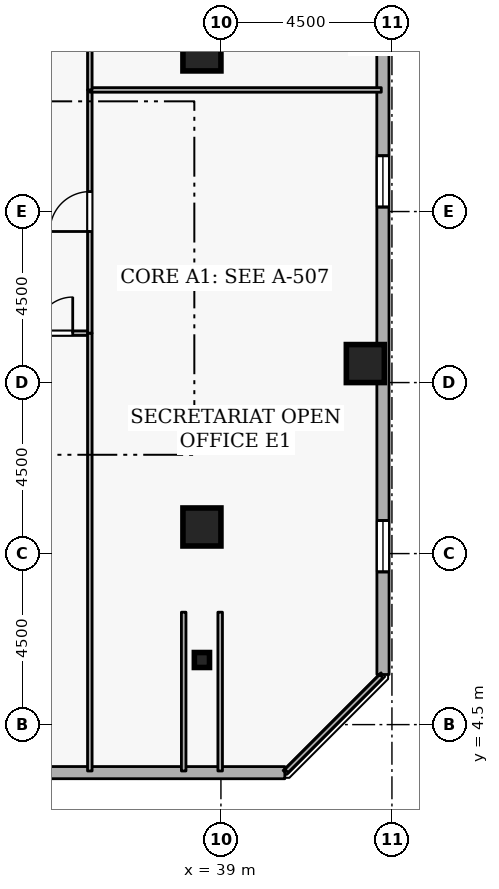
"""IFC4 building model, lengths in metres.
Left out: names, types, materials, properties, quantities, classifications, styles, units other than length and angle.
Written with IfcOpenShell. Run it as: python <this file> out.ifc"""

import sys

from ifc_helpers import new_model, si_unit, direction, frame, frame_2d, origin, origin_2d, place, context, subcontext, project, spatial, rectangle, i_section, extrude, element, fill, save


model = new_model("IFC4")
c1 = context("Model", 3, precision=1e-05, world=origin(), true_north=direction((0.0, 1.0)))
c2 = subcontext(c1, "Body", "Model", "MODEL_VIEW")
j1 = project(units=[si_unit("LENGTHUNIT", "METRE"), si_unit("PLANEANGLEUNIT", "RADIAN")], contexts=[c1])
p1 = place(None, origin())
s1 = spatial("IfcSite", under=j1, at=p1, CompositionType="ELEMENT")
p2 = place(p1, origin())
s2 = spatial("IfcBuilding", under=s1, at=p2, CompositionType="ELEMENT")
p3 = place(p2, frame((0.0, 0.0, 251.1)))
s3 = spatial("IfcBuildingStorey", under=s2, at=p3, CompositionType="ELEMENT", Elevation=251.1)
for number, where, z_axis, x_axis in (
    (1, (38.5, 9.7, 0.0), (0.0, 0.0, 1.0), (1.0, 0.0, 0.0)),
    (2, (42.8, 14.0, 0.0), (0.0, 0.0, 1.0), (1.0, 0.0, 0.0)),
    (3, (38.5, 22.2, 0.0), (0.0, 0.0, 1.0), (1.0, 0.0, 0.0)),
):
    element("IfcColumn", number, at=place(p3, frame(where, z_axis=z_axis, x_axis=x_axis)), inside=s3, PredefinedType="COLUMN", context=c2, shape_type="SweptSolid", body=[
        extrude(rectangle(XDim=1.0, YDim=1.0, at=origin_2d()), origin(), (0.0, 0.0, 1.0), 3.6),
    ])
p4 = place(p3, frame((38.5, 6.2, 0.0), z_axis=(0.0, 0.0, 1.0), x_axis=(1.0, 0.0, 0.0)))
e4 = element("IfcColumn", 4, at=p4, inside=s3, PredefinedType="COLUMN", context=c2, shape_type="SweptSolid", body=[
    extrude(i_section(OverallWidth=0.399, OverallDepth=0.394, WebThickness=0.023, FlangeThickness=0.037, FilletRadius=0.015, at=origin_2d()), origin(), (0.0, 0.0, 1.0), 3.6),
])
p5 = place(p3, frame((6.249, 3.242, 0.0), z_axis=(0.0, 0.0, 1.0), x_axis=(0.999999983007, -0.000184351399, 0.0)))
e5 = element("IfcWall", 5, at=p5, inside=s3, PredefinedType="STANDARD", context=c2, shape_type="SweptSolid", body=[
    extrude(rectangle(XDim=34.432, YDim=0.32, at=frame_2d((17.216, 0.0))), origin(), (0.0, 0.0, 1.0), 2.22),
])
p6 = place(p5, frame((2.7, 0.0, 0.72)))
e6 = element("IfcOpeningElement", 6, at=p6, cuts=e5, PredefinedType="OPENING", context=c2, shape_type="SweptSolid", body=[
    extrude(rectangle(XDim=1.35, YDim=1.05, at=frame_2d((0.675, 0.525))), frame((0.0, 0.17, 0.0), z_axis=(0.0, -1.0, 0.0), x_axis=(1.0, 0.0, 0.0)), (0.0, 0.0, 1.0), 0.34),
])
p7 = place(p5, frame((12.3, 0.0, 0.72)))
e7 = element("IfcOpeningElement", 7, at=p7, cuts=e5, PredefinedType="OPENING", context=c2, shape_type="SweptSolid", body=[
    extrude(rectangle(XDim=1.35, YDim=1.05, at=frame_2d((0.675, 0.525))), frame((0.0, 0.17, 0.0), z_axis=(0.0, -1.0, 0.0), x_axis=(1.0, 0.0, 0.0)), (0.0, 0.0, 1.0), 0.34),
])
p8 = place(p5, frame((17.1, 0.0, 0.72)))
e8 = element("IfcOpeningElement", 8, at=p8, cuts=e5, PredefinedType="OPENING", context=c2, shape_type="SweptSolid", body=[
    extrude(rectangle(XDim=1.35, YDim=1.05, at=frame_2d((0.675, 0.525))), frame((0.0, 0.17, 0.0), z_axis=(0.0, -1.0, 0.0), x_axis=(1.0, 0.0, 0.0)), (0.0, 0.0, 1.0), 0.34),
])
p9 = place(p5, frame((21.9, 0.0, 0.72)))
e9 = element("IfcOpeningElement", 9, at=p9, cuts=e5, PredefinedType="OPENING", context=c2, shape_type="SweptSolid", body=[
    extrude(rectangle(XDim=1.35, YDim=1.05, at=frame_2d((0.675, 0.525))), frame((0.0, 0.17, 0.0), z_axis=(0.0, -1.0, 0.0), x_axis=(1.0, 0.0, 0.0)), (0.0, 0.0, 1.0), 0.34),
])
p10 = place(p3, frame((43.265, 5.819, 0.0), z_axis=(0.0, 0.0, 1.0), x_axis=(-0.000184351399, 0.999999983007, 0.0)))
e10 = element("IfcWall", 10, at=p10, inside=s3, PredefinedType="STANDARD", context=c2, shape_type="SweptSolid", body=[
    extrude(rectangle(XDim=34.432, YDim=0.32, at=frame_2d((17.216, 0.0))), origin(), (0.0, 0.0, 1.0), 2.22),
])
p11 = place(p10, frame((2.7, 0.0, 0.72)))
e11 = element("IfcOpeningElement", 11, at=p11, cuts=e10, PredefinedType="OPENING", context=c2, shape_type="SweptSolid", body=[
    extrude(rectangle(XDim=1.35, YDim=1.05, at=frame_2d((0.675, 0.525))), frame((0.0, 0.17, 0.0), z_axis=(0.0, -1.0, 0.0), x_axis=(1.0, 0.0, 0.0)), (0.0, 0.0, 1.0), 0.34),
])
p12 = place(p10, frame((12.3, 0.0, 0.72)))
e12 = element("IfcOpeningElement", 12, at=p12, cuts=e10, PredefinedType="OPENING", context=c2, shape_type="SweptSolid", body=[
    extrude(rectangle(XDim=1.35, YDim=1.05, at=frame_2d((0.675, 0.525))), frame((0.0, 0.17, 0.0), z_axis=(0.0, -1.0, 0.0), x_axis=(1.0, 0.0, 0.0)), (0.0, 0.0, 1.0), 0.34),
])
p13 = place(p10, frame((17.1, 0.0, 0.72)))
e13 = element("IfcOpeningElement", 13, at=p13, cuts=e10, PredefinedType="OPENING", context=c2, shape_type="SweptSolid", body=[
    extrude(rectangle(XDim=1.35, YDim=1.05, at=frame_2d((0.675, 0.525))), frame((0.0, 0.17, 0.0), z_axis=(0.0, -1.0, 0.0), x_axis=(1.0, 0.0, 0.0)), (0.0, 0.0, 1.0), 0.34),
])
p14 = place(p10, frame((26.7, 0.0, 0.72)))
e14 = element("IfcOpeningElement", 14, at=p14, cuts=e10, PredefinedType="OPENING", context=c2, shape_type="SweptSolid", body=[
    extrude(rectangle(XDim=1.35, YDim=1.05, at=frame_2d((0.675, 0.525))), frame((0.0, 0.17, 0.0), z_axis=(0.0, -1.0, 0.0), x_axis=(1.0, 0.0, 0.0)), (0.0, 0.0, 1.0), 0.34),
])
p15 = place(p3, frame((33.7, 14.8, 0.0), z_axis=(0.0, 0.0, 1.0), x_axis=(1.0, 0.0, 0.0)))
e15 = element("IfcWall", 15, at=p15, inside=s3, PredefinedType="PARTITIONING", context=c2, shape_type="SweptSolid", body=[
    extrude(rectangle(XDim=1.85, YDim=0.12, at=frame_2d((0.925, 0.0))), origin(), (0.0, 0.0, 1.0), 3.32),
])
p16 = place(p15, frame((0.45, 0.0, 0.0)))
e16 = element("IfcOpeningElement", 16, at=p16, cuts=e15, PredefinedType="OPENING", context=c2, shape_type="SweptSolid", body=[
    extrude(rectangle(XDim=0.95, YDim=2.1, at=frame_2d((0.475, 1.05))), frame((0.0, 0.07, 0.0), z_axis=(0.0, -1.0, 0.0), x_axis=(1.0, 0.0, 0.0)), (0.0, 0.0, 1.0), 0.14),
])
p17 = place(p3, frame((35.55, 14.8, 0.0), z_axis=(0.0, 0.0, 1.0), x_axis=(0.0, -1.0, 0.0)))
e17 = element("IfcWall", 17, at=p17, inside=s3, PredefinedType="PARTITIONING", context=c2, shape_type="SweptSolid", body=[
    extrude(rectangle(XDim=11.52, YDim=0.12, at=frame_2d((5.76, 0.0))), origin(), (0.0, 0.0, 1.0), 3.32),
])
for number, where, z_axis, x_axis in (
    (18, (38.98, 3.28, 0.0), (0.0, 0.0, 1.0), (0.0, 1.0, 0.0)),
    (19, (38.02, 7.458, 0.0), (0.0, 0.0, 1.0), (0.0, -1.0, 0.0)),
):
    element("IfcWall", number, at=place(p3, frame(where, z_axis=z_axis, x_axis=x_axis)), inside=s3, PredefinedType="PARTITIONING", context=c2, shape_type="SweptSolid", body=[
        extrude(rectangle(XDim=4.178, YDim=0.12, at=frame_2d((2.089, 0.0))), origin(), (0.0, 0.0, 1.0), 1.785),
    ])
p18 = place(p3, frame((35.55, 14.8, 0.0), z_axis=(0.0, 0.0, 1.0), x_axis=(0.0, 1.0, 0.0)))
e20 = element("IfcWall", 20, at=p18, inside=s3, PredefinedType="PARTITIONING", context=c2, shape_type="SweptSolid", body=[
    extrude(rectangle(XDim=6.4, YDim=0.12, at=frame_2d((3.2, 0.0))), origin(), (0.0, 0.0, 1.0), 3.32),
])
p19 = place(p18, frame((2.675, 0.0, 0.0)))
e21 = element("IfcOpeningElement", 21, at=p19, cuts=e20, PredefinedType="OPENING", context=c2, shape_type="SweptSolid", body=[
    extrude(rectangle(XDim=1.05, YDim=2.1, at=frame_2d((0.525, 1.05))), frame((0.0, 0.07, 0.0), z_axis=(0.0, -1.0, 0.0), x_axis=(1.0, 0.0, 0.0)), (0.0, 0.0, 1.0), 0.14),
])
p20 = place(p3, frame((35.55, 21.2, 0.0), z_axis=(0.0, 0.0, 1.0), x_axis=(1.0, 0.0, 0.0)))
e22 = element("IfcWall", 22, at=p20, inside=s3, PredefinedType="PARTITIONING", context=c2, shape_type="SweptSolid", body=[
    extrude(rectangle(XDim=7.67, YDim=0.12, at=frame_2d((3.835, 0.0))), origin(), (0.0, 0.0, 1.0), 3.32),
])
p21 = place(p3, frame((43.22, 5.775, 0.0), z_axis=(0.0, 0.0, 1.0), x_axis=(-0.707106781187, -0.707106781187, 0.0)))
e23 = element("IfcWall", 23, at=p21, inside=s3, PredefinedType="PARTITIONING", context=c2, shape_type="SweptSolid", body=[
    extrude(rectangle(XDim=3.528, YDim=0.12, at=frame_2d((1.764, 0.0))), origin(), (0.0, 0.0, 1.0), 3.32),
])
p22 = place(p3, frame((35.55, 21.2, 0.0), z_axis=(0.0, 0.0, 1.0), x_axis=(0.0, 1.0, 0.0)))
e24 = element("IfcWall", 24, at=p22, inside=s3, PredefinedType="PARTITIONING", context=c2, shape_type="SweptSolid", body=[
    extrude(rectangle(XDim=5.4, YDim=0.12, at=frame_2d((2.7, 0.0))), origin(), (0.0, 0.0, 1.0), 3.32),
])
p23 = place(p22, frame((2.225, 0.0, 0.0)))
e25 = element("IfcOpeningElement", 25, at=p23, cuts=e24, PredefinedType="OPENING", context=c2, shape_type="SweptSolid", body=[
    extrude(rectangle(XDim=0.95, YDim=2.1, at=frame_2d((0.475, 1.05))), frame((0.0, 0.07, 0.0), z_axis=(0.0, -1.0, 0.0), x_axis=(1.0, 0.0, 0.0)), (0.0, 0.0, 1.0), 0.14),
])
p24 = place(p11, origin())
e26 = element("IfcWindow", 26, at=p24, inside=s3, PartitioningType="SINGLE_PANEL", PredefinedType="WINDOW", context=c2, shape_type="SweptSolid", body=[
    extrude(rectangle(XDim=1.35, YDim=1.05, at=frame_2d((0.675, 0.525))), frame((0.0, 0.03, 0.0), z_axis=(0.0, -1.0, 0.0), x_axis=(1.0, 0.0, 0.0)), (0.0, 0.0, 1.0), 0.06),
])
fill(e11, e26)
p25 = place(p12, origin())
e27 = element("IfcWindow", 27, at=p25, inside=s3, PartitioningType="SINGLE_PANEL", PredefinedType="WINDOW", context=c2, shape_type="SweptSolid", body=[
    extrude(rectangle(XDim=1.35, YDim=1.05, at=frame_2d((0.675, 0.525))), frame((0.0, 0.03, 0.0), z_axis=(0.0, -1.0, 0.0), x_axis=(1.0, 0.0, 0.0)), (0.0, 0.0, 1.0), 0.06),
])
fill(e12, e27)
p26 = place(p16, origin())
e28 = element("IfcDoor", 28, at=p26, inside=s3, OperationType="SINGLE_SWING_RIGHT", PredefinedType="DOOR", context=c2, shape_type="SweptSolid", body=[
    extrude(rectangle(XDim=0.95, YDim=2.1, at=frame_2d((0.475, 1.05))), frame((0.0, 0.025, 0.0), z_axis=(0.0, -1.0, 0.0), x_axis=(1.0, 0.0, 0.0)), (0.0, 0.0, 1.0), 0.05),
])
fill(e16, e28)
p27 = place(p19, origin())
e29 = element("IfcDoor", 29, at=p27, inside=s3, OperationType="SINGLE_SWING_LEFT", PredefinedType="DOOR", context=c2, shape_type="SweptSolid", body=[
    extrude(rectangle(XDim=1.05, YDim=2.1, at=frame_2d((0.525, 1.05))), frame((0.0, 0.025, 0.0), z_axis=(0.0, -1.0, 0.0), x_axis=(1.0, 0.0, 0.0)), (0.0, 0.0, 1.0), 0.05),
])
fill(e21, e29)
save(model, sys.argv[1])
